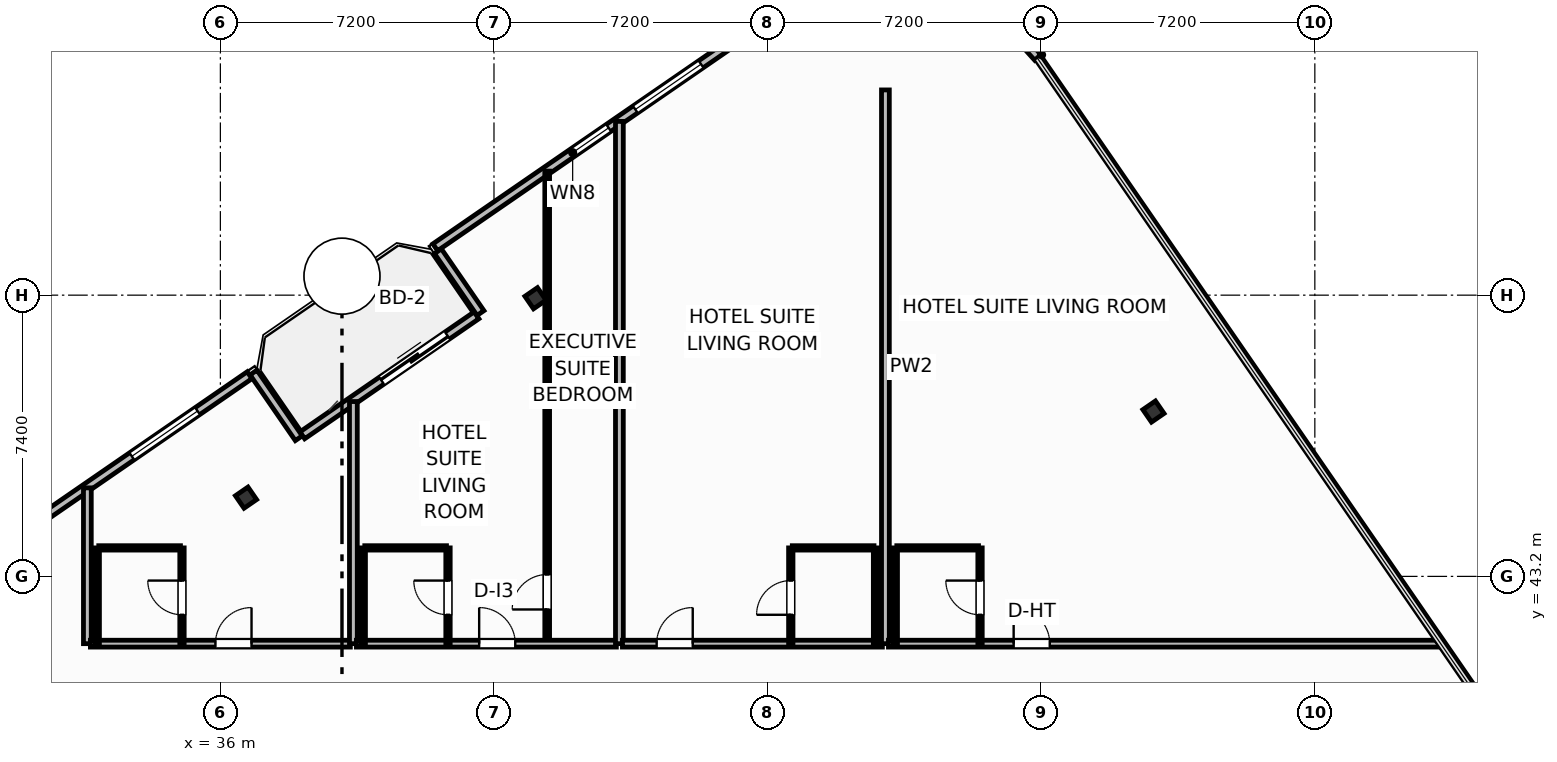
"""IFC4 building model, lengths in metres.
Left out: names, types, materials, properties, quantities, classifications, styles, units other than length and angle.
Written with IfcOpenShell. Run it as: python <this file> out.ifc"""

import sys

from ifc_helpers import new_model, si_unit, direction, frame, frame_2d, origin, origin_2d, place, context, subcontext, project, spatial, rectangle, i_section, extrude, element, fill, save


model = new_model("IFC4")
c1 = context("Model", 3, precision=1e-05, world=origin(), true_north=direction((0.0, 1.0)))
c2 = subcontext(c1, "Body", "Model", "MODEL_VIEW")
j1 = project(units=[si_unit("LENGTHUNIT", "METRE"), si_unit("PLANEANGLEUNIT", "RADIAN")], contexts=[c1])
p1 = place(None, origin())
s1 = spatial("IfcSite", under=j1, at=p1, CompositionType="ELEMENT")
p2 = place(p1, origin())
s2 = spatial("IfcBuilding", under=s1, at=p2, CompositionType="ELEMENT")
p3 = place(p2, frame((0.0, 0.0, 280.4)))
s3 = spatial("IfcBuildingStorey", under=s2, at=p3, CompositionType="ELEMENT", Elevation=280.4)
for number, where, z_axis, x_axis in (
    (1, (60.554, 47.537, 0.0), (0.0, 0.0, 1.0), (0.824, 0.567, 0.0)),
    (2, (44.292, 50.519, 0.0), (0.0, 0.0, 1.0), (0.824, 0.567, 0.0)),
    (3, (36.675, 45.272, 0.0), (0.0, 0.0, 1.0), (0.824, 0.567, 0.0)),
):
    element("IfcColumn", number, at=place(p3, frame(where, z_axis=z_axis, x_axis=x_axis)), inside=s3, PredefinedType="COLUMN", context=c2, shape_type="SweptSolid", body=[
        extrude(i_section(OverallWidth=0.401, OverallDepth=0.399, WebThickness=0.025, FlangeThickness=0.04, FilletRadius=0.022, at=origin_2d()), origin(), (0.0, 0.0, 1.0), 3.7),
    ])
p4 = place(p3, frame((38.156, 46.912, 0.0), z_axis=(0.0, 0.0, 1.0), x_axis=(0.823527178548, 0.567276816195, 0.0)))
e4 = element("IfcWall", 4, at=p4, inside=s3, PredefinedType="SOLIDWALL", context=c2, shape_type="SweptSolid", body=[
    extrude(rectangle(XDim=5.567, YDim=0.22, at=frame_2d((2.783, 0.0))), origin(), (0.0, 0.0, 1.0), 2.73),
])
p5 = place(p4, frame((2.534, 0.0, 0.0)))
e5 = element("IfcOpeningElement", 5, at=p5, cuts=e4, PredefinedType="OPENING", context=c2, shape_type="SweptSolid", body=[
    extrude(rectangle(XDim=2.1, YDim=2.3, at=frame_2d((1.05, 1.15))), frame((0.0, 0.12, 0.0), z_axis=(0.0, -1.0, 0.0), x_axis=(1.0, 0.0, 0.0)), (0.0, 0.0, 1.0), 0.24),
])
p6 = place(p3, frame((57.51, 56.855, 0.0), z_axis=(0.0, 0.0, 1.0), x_axis=(-0.669853727156, 0.742493086982, 0.0)))
e6 = element("IfcWall", 6, at=p6, inside=s3, PredefinedType="SOLIDWALL", context=c2, shape_type="SweptSolid", body=[
    extrude(rectangle(XDim=1.274, YDim=0.22, at=frame_2d((0.637, 0.0))), origin(), (0.0, 0.0, 1.0), 2.73),
])
p7 = place(p3, frame((50.697, 58.087, 0.0), z_axis=(0.0, 0.0, 1.0), x_axis=(-0.823539455464, -0.567258993137, 0.0)))
e7 = element("IfcWall", 7, at=p7, inside=s3, PredefinedType="SOLIDWALL", context=c2, shape_type="SweptSolid", body=[
    extrude(rectangle(XDim=10.98, YDim=0.22, at=frame_2d((5.49, 0.0))), origin(), (0.0, 0.0, 1.0), 2.73),
])
p8 = place(p7, frame((2.486, 0.0, 0.8)))
e8 = element("IfcOpeningElement", 8, at=p8, cuts=e7, PredefinedType="OPENING", context=c2, shape_type="SweptSolid", body=[
    extrude(rectangle(XDim=2.1, YDim=1.75, at=frame_2d((1.05, 0.875))), frame((0.0, 0.12, 0.0), z_axis=(0.0, -1.0, 0.0), x_axis=(1.0, 0.0, 0.0)), (0.0, 0.0, 1.0), 0.24),
])
p9 = place(p7, frame((5.439, 0.0, 0.8)))
e9 = element("IfcOpeningElement", 9, at=p9, cuts=e7, PredefinedType="OPENING", context=c2, shape_type="SweptSolid", body=[
    extrude(rectangle(XDim=1.15, YDim=1.4, at=frame_2d((0.575, 0.7))), frame((0.0, 0.12, 0.0), z_axis=(0.0, -1.0, 0.0), x_axis=(1.0, 0.0, 0.0)), (0.0, 0.0, 1.0), 0.24),
])
p10 = place(p3, frame((41.725, 51.756, 0.0), z_axis=(0.0, 0.0, 1.0), x_axis=(0.567273565974, -0.823529417415, 0.0)))
e10 = element("IfcWall", 10, at=p10, inside=s3, PredefinedType="SOLIDWALL", context=c2, shape_type="SweptSolid", body=[
    extrude(rectangle(XDim=1.975, YDim=0.22, at=frame_2d((0.988, 0.0))), origin(), (0.0, 0.0, 1.0), 2.73),
])
p11 = place(p3, frame((38.063, 46.835, 0.0), z_axis=(0.0, 0.0, 1.0), x_axis=(-0.567219383419, 0.823566737474, 0.0)))
e11 = element("IfcWall", 11, at=p11, inside=s3, PredefinedType="SOLIDWALL", context=c2, shape_type="SweptSolid", body=[
    extrude(rectangle(XDim=2.1, YDim=0.22, at=frame_2d((1.05, 0.0))), origin(), (0.0, 0.0, 1.0), 2.73),
])
p12 = place(p3, frame((36.769, 48.494, 0.0), z_axis=(0.0, 0.0, 1.0), x_axis=(-0.823521165086, -0.56728554596, 0.0)))
e12 = element("IfcWall", 12, at=p12, inside=s3, PredefinedType="SOLIDWALL", context=c2, shape_type="SweptSolid", body=[
    extrude(rectangle(XDim=8.035, YDim=0.22, at=frame_2d((4.018, 0.0))), origin(), (0.0, 0.0, 1.0), 2.73),
])
p13 = place(p12, frame((1.662, 0.0, 0.8)))
e13 = element("IfcOpeningElement", 13, at=p13, cuts=e12, PredefinedType="OPENING", context=c2, shape_type="SweptSolid", body=[
    extrude(rectangle(XDim=2.1, YDim=1.75, at=frame_2d((1.05, 0.875))), frame((0.0, 0.12, 0.0), z_axis=(0.0, -1.0, 0.0), x_axis=(1.0, 0.0, 0.0)), (0.0, 0.0, 1.0), 0.24),
])
p14 = place(p3, frame((32.5, 41.43, 0.0), z_axis=(0.0, 0.0, 1.0), x_axis=(0.0, 1.0, 0.0)))
e14 = element("IfcWall", 14, at=p14, inside=s3, PredefinedType="PARTITIONING", context=c2, shape_type="SweptSolid", body=[
    extrude(rectangle(XDim=4.099, YDim=0.205, at=frame_2d((2.05, 0.0))), origin(), (0.0, 0.0, 1.0), 3.45),
])
p15 = place(p3, frame((32.58, 41.43, 0.0), z_axis=(0.0, 0.0, 1.0), x_axis=(1.0, 0.0, 0.0)))
e15 = element("IfcWall", 15, at=p15, inside=s3, PredefinedType="PARTITIONING", context=c2, shape_type="SweptSolid", body=[
    extrude(rectangle(XDim=6.84, YDim=0.18, at=frame_2d((3.42, 0.0))), origin(), (0.0, 0.0, 1.0), 3.45),
])
p16 = place(p15, frame((3.29, 0.0, 0.0)))
e16 = element("IfcOpeningElement", 16, at=p16, cuts=e15, PredefinedType="OPENING", context=c2, shape_type="SweptSolid", body=[
    extrude(rectangle(XDim=0.95, YDim=2.15, at=frame_2d((0.475, 1.075))), frame((0.0, 0.1, 0.0), z_axis=(0.0, -1.0, 0.0), x_axis=(1.0, 0.0, 0.0)), (0.0, 0.0, 1.0), 0.2),
])
p17 = place(p3, frame((32.8, 43.95, 0.0), z_axis=(0.0, 0.0, 1.0), x_axis=(1.0, 0.0, 0.0)))
e17 = element("IfcWall", 17, at=p17, inside=s3, PredefinedType="PARTITIONING", context=c2, shape_type="SweptSolid", body=[
    extrude(rectangle(XDim=2.15, YDim=0.115, at=frame_2d((1.075, 0.0))), origin(), (0.0, 0.0, 1.0), 3.45),
])
p18 = place(p3, frame((34.99, 41.43, 0.0), z_axis=(0.0, 0.0, 1.0), x_axis=(0.0, 1.0, 0.0)))
e18 = element("IfcWall", 18, at=p18, inside=s3, PredefinedType="PARTITIONING", context=c2, shape_type="SweptSolid", body=[
    extrude(rectangle(XDim=2.52, YDim=0.115, at=frame_2d((1.26, 0.0))), origin(), (0.0, 0.0, 1.0), 3.45),
])
p19 = place(p18, frame((0.76, 0.0, 0.0)))
e19 = element("IfcOpeningElement", 19, at=p19, cuts=e18, PredefinedType="OPENING", context=c2, shape_type="SweptSolid", body=[
    extrude(rectangle(XDim=0.9, YDim=2.05, at=frame_2d((0.45, 1.025))), frame((0.0, 0.067, 0.0), z_axis=(0.0, -1.0, 0.0), x_axis=(1.0, 0.0, 0.0)), (0.0, 0.0, 1.0), 0.135),
])
p20 = place(p3, frame((32.76, 41.43, 0.0), z_axis=(0.0, 0.0, 1.0), x_axis=(0.0, 1.0, 0.0)))
e20 = element("IfcWall", 20, at=p20, inside=s3, PredefinedType="PARTITIONING", context=c2, shape_type="SweptSolid", body=[
    extrude(rectangle(XDim=2.52, YDim=0.115, at=frame_2d((1.26, 0.0))), origin(), (0.0, 0.0, 1.0), 3.45),
])
p21 = place(p3, frame((39.5, 41.43, 0.0), z_axis=(0.0, 0.0, 1.0), x_axis=(0.0, 1.0, 0.0)))
e21 = element("IfcWall", 21, at=p21, inside=s3, PredefinedType="PARTITIONING", context=c2, shape_type="SweptSolid", body=[
    extrude(rectangle(XDim=6.371, YDim=0.205, at=frame_2d((3.186, 0.0))), origin(), (0.0, 0.0, 1.0), 3.45),
])
p22 = place(p3, frame((44.6, 41.43, 0.0), z_axis=(0.0, 0.0, 1.0), x_axis=(0.0, 1.0, 0.0)))
e22 = element("IfcWall", 22, at=p22, inside=s3, PredefinedType="PARTITIONING", context=c2, shape_type="SweptSolid", body=[
    extrude(rectangle(XDim=12.434, YDim=0.125, at=frame_2d((6.217, 0.0))), origin(), (0.0, 0.0, 1.0), 3.45),
])
p23 = place(p22, frame((0.9, 0.0, 0.0)))
e23 = element("IfcOpeningElement", 23, at=p23, cuts=e22, PredefinedType="OPENING", context=c2, shape_type="SweptSolid", body=[
    extrude(rectangle(XDim=0.92, YDim=2.05, at=frame_2d((0.46, 1.025))), frame((0.0, 0.073, 0.0), z_axis=(0.0, -1.0, 0.0), x_axis=(1.0, 0.0, 0.0)), (0.0, 0.0, 1.0), 0.145),
])
p24 = place(p3, frame((39.58, 41.43, 0.0), z_axis=(0.0, 0.0, 1.0), x_axis=(1.0, 0.0, 0.0)))
e24 = element("IfcWall", 24, at=p24, inside=s3, PredefinedType="PARTITIONING", context=c2, shape_type="SweptSolid", body=[
    extrude(rectangle(XDim=6.84, YDim=0.18, at=frame_2d((3.42, 0.0))), origin(), (0.0, 0.0, 1.0), 3.45),
])
p25 = place(p24, frame((3.23, 0.0, 0.0)))
e25 = element("IfcOpeningElement", 25, at=p25, cuts=e24, PredefinedType="OPENING", context=c2, shape_type="SweptSolid", body=[
    extrude(rectangle(XDim=0.95, YDim=2.15, at=frame_2d((0.475, 1.075))), frame((0.0, 0.1, 0.0), z_axis=(0.0, -1.0, 0.0), x_axis=(1.0, 0.0, 0.0)), (0.0, 0.0, 1.0), 0.2),
])
p26 = place(p3, frame((39.8, 43.95, 0.0), z_axis=(0.0, 0.0, 1.0), x_axis=(1.0, 0.0, 0.0)))
e26 = element("IfcWall", 26, at=p26, inside=s3, PredefinedType="PARTITIONING", context=c2, shape_type="SweptSolid", body=[
    extrude(rectangle(XDim=2.15, YDim=0.115, at=frame_2d((1.075, 0.0))), origin(), (0.0, 0.0, 1.0), 3.45),
])
p27 = place(p3, frame((41.99, 41.43, 0.0), z_axis=(0.0, 0.0, 1.0), x_axis=(0.0, 1.0, 0.0)))
e27 = element("IfcWall", 27, at=p27, inside=s3, PredefinedType="PARTITIONING", context=c2, shape_type="SweptSolid", body=[
    extrude(rectangle(XDim=2.52, YDim=0.115, at=frame_2d((1.26, 0.0))), origin(), (0.0, 0.0, 1.0), 3.45),
])
p28 = place(p27, frame((0.76, 0.0, 0.0)))
e28 = element("IfcOpeningElement", 28, at=p28, cuts=e27, PredefinedType="OPENING", context=c2, shape_type="SweptSolid", body=[
    extrude(rectangle(XDim=0.9, YDim=2.05, at=frame_2d((0.45, 1.025))), frame((0.0, 0.067, 0.0), z_axis=(0.0, -1.0, 0.0), x_axis=(1.0, 0.0, 0.0)), (0.0, 0.0, 1.0), 0.135),
])
p29 = place(p3, frame((39.76, 41.43, 0.0), z_axis=(0.0, 0.0, 1.0), x_axis=(0.0, 1.0, 0.0)))
e29 = element("IfcWall", 29, at=p29, inside=s3, PredefinedType="PARTITIONING", context=c2, shape_type="SweptSolid", body=[
    extrude(rectangle(XDim=2.52, YDim=0.115, at=frame_2d((1.26, 0.0))), origin(), (0.0, 0.0, 1.0), 3.45),
])
p30 = place(p3, frame((46.5, 41.43, 0.0), z_axis=(0.0, 0.0, 1.0), x_axis=(0.0, 1.0, 0.0)))
e30 = element("IfcWall", 30, at=p30, inside=s3, PredefinedType="PARTITIONING", context=c2, shape_type="SweptSolid", body=[
    extrude(rectangle(XDim=13.743, YDim=0.205, at=frame_2d((6.871, 0.0))), origin(), (0.0, 0.0, 1.0), 3.45),
])
p31 = place(p3, frame((46.58, 41.43, 0.0), z_axis=(0.0, 0.0, 1.0), x_axis=(1.0, 0.0, 0.0)))
e31 = element("IfcWall", 31, at=p31, inside=s3, PredefinedType="PARTITIONING", context=c2, shape_type="SweptSolid", body=[
    extrude(rectangle(XDim=6.84, YDim=0.18, at=frame_2d((3.42, 0.0))), origin(), (0.0, 0.0, 1.0), 3.45),
])
p32 = place(p31, frame((0.9, 0.0, 0.0)))
e32 = element("IfcOpeningElement", 32, at=p32, cuts=e31, PredefinedType="OPENING", context=c2, shape_type="SweptSolid", body=[
    extrude(rectangle(XDim=0.95, YDim=2.15, at=frame_2d((0.475, 1.075))), frame((0.0, 0.1, 0.0), z_axis=(0.0, -1.0, 0.0), x_axis=(1.0, 0.0, 0.0)), (0.0, 0.0, 1.0), 0.2),
])
p33 = place(p3, frame((51.05, 43.95, 0.0), z_axis=(0.0, 0.0, 1.0), x_axis=(1.0, 0.0, 0.0)))
e33 = element("IfcWall", 33, at=p33, inside=s3, PredefinedType="PARTITIONING", context=c2, shape_type="SweptSolid", body=[
    extrude(rectangle(XDim=2.15, YDim=0.115, at=frame_2d((1.075, 0.0))), origin(), (0.0, 0.0, 1.0), 3.45),
])
p34 = place(p3, frame((51.01, 41.43, 0.0), z_axis=(0.0, 0.0, 1.0), x_axis=(0.0, 1.0, 0.0)))
e34 = element("IfcWall", 34, at=p34, inside=s3, PredefinedType="PARTITIONING", context=c2, shape_type="SweptSolid", body=[
    extrude(rectangle(XDim=2.52, YDim=0.115, at=frame_2d((1.26, 0.0))), origin(), (0.0, 0.0, 1.0), 3.45),
])
p35 = place(p34, frame((0.76, 0.0, 0.0)))
e35 = element("IfcOpeningElement", 35, at=p35, cuts=e34, PredefinedType="OPENING", context=c2, shape_type="SweptSolid", body=[
    extrude(rectangle(XDim=0.9, YDim=2.05, at=frame_2d((0.45, 1.025))), frame((0.0, 0.067, 0.0), z_axis=(0.0, -1.0, 0.0), x_axis=(1.0, 0.0, 0.0)), (0.0, 0.0, 1.0), 0.135),
])
p36 = place(p3, frame((53.24, 41.43, 0.0), z_axis=(0.0, 0.0, 1.0), x_axis=(0.0, 1.0, 0.0)))
e36 = element("IfcWall", 36, at=p36, inside=s3, PredefinedType="PARTITIONING", context=c2, shape_type="SweptSolid", body=[
    extrude(rectangle(XDim=2.52, YDim=0.115, at=frame_2d((1.26, 0.0))), origin(), (0.0, 0.0, 1.0), 3.45),
])
p37 = place(p3, frame((53.5, 41.43, 0.0), z_axis=(0.0, 0.0, 1.0), x_axis=(0.0, 1.0, 0.0)))
e37 = element("IfcWall", 37, at=p37, inside=s3, PredefinedType="PARTITIONING", context=c2, shape_type="SweptSolid", body=[
    extrude(rectangle(XDim=14.57, YDim=0.205, at=frame_2d((7.285, 0.0))), origin(), (0.0, 0.0, 1.0), 3.45),
])
p38 = place(p3, frame((53.58, 41.43, 0.0), z_axis=(0.0, 0.0, 1.0), x_axis=(1.0, 0.0, 0.0)))
e38 = element("IfcWall", 38, at=p38, inside=s3, PredefinedType="PARTITIONING", context=c2, shape_type="SweptSolid", body=[
    extrude(rectangle(XDim=14.492, YDim=0.18, at=frame_2d((7.246, 0.0))), origin(), (0.0, 0.0, 1.0), 3.45),
])
p39 = place(p38, frame((3.294, 0.0, 0.0)))
e39 = element("IfcOpeningElement", 39, at=p39, cuts=e38, PredefinedType="OPENING", context=c2, shape_type="SweptSolid", body=[
    extrude(rectangle(XDim=0.95, YDim=2.15, at=frame_2d((0.475, 1.075))), frame((0.0, 0.1, 0.0), z_axis=(0.0, -1.0, 0.0), x_axis=(1.0, 0.0, 0.0)), (0.0, 0.0, 1.0), 0.2),
])
p40 = place(p3, frame((53.8, 43.95, 0.0), z_axis=(0.0, 0.0, 1.0), x_axis=(1.0, 0.0, 0.0)))
e40 = element("IfcWall", 40, at=p40, inside=s3, PredefinedType="PARTITIONING", context=c2, shape_type="SweptSolid", body=[
    extrude(rectangle(XDim=2.15, YDim=0.115, at=frame_2d((1.075, 0.0))), origin(), (0.0, 0.0, 1.0), 3.45),
])
p41 = place(p3, frame((55.99, 41.43, 0.0), z_axis=(0.0, 0.0, 1.0), x_axis=(0.0, 1.0, 0.0)))
e41 = element("IfcWall", 41, at=p41, inside=s3, PredefinedType="PARTITIONING", context=c2, shape_type="SweptSolid", body=[
    extrude(rectangle(XDim=2.52, YDim=0.115, at=frame_2d((1.26, 0.0))), origin(), (0.0, 0.0, 1.0), 3.45),
])
p42 = place(p41, frame((0.76, 0.0, 0.0)))
e42 = element("IfcOpeningElement", 42, at=p42, cuts=e41, PredefinedType="OPENING", context=c2, shape_type="SweptSolid", body=[
    extrude(rectangle(XDim=0.9, YDim=2.05, at=frame_2d((0.45, 1.025))), frame((0.0, 0.067, 0.0), z_axis=(0.0, -1.0, 0.0), x_axis=(1.0, 0.0, 0.0)), (0.0, 0.0, 1.0), 0.135),
])
p43 = place(p3, frame((53.76, 41.43, 0.0), z_axis=(0.0, 0.0, 1.0), x_axis=(0.0, 1.0, 0.0)))
e43 = element("IfcWall", 43, at=p43, inside=s3, PredefinedType="PARTITIONING", context=c2, shape_type="SweptSolid", body=[
    extrude(rectangle(XDim=2.52, YDim=0.115, at=frame_2d((1.26, 0.0))), origin(), (0.0, 0.0, 1.0), 3.45),
])
p44 = place(p5, origin())
e44 = element("IfcDoor", 44, at=p44, inside=s3, OperationType="SLIDING_TO_LEFT", PredefinedType="DOOR", context=c2, shape_type="SweptSolid", body=[
    extrude(rectangle(XDim=2.1, YDim=2.3, at=frame_2d((1.05, 1.15))), frame((0.0, 0.025, 0.0), z_axis=(0.0, -1.0, 0.0), x_axis=(1.0, 0.0, 0.0)), (0.0, 0.0, 1.0), 0.05),
])
fill(e5, e44)
p45 = place(p8, origin())
e45 = element("IfcWindow", 45, at=p45, inside=s3, PartitioningType="SINGLE_PANEL", PredefinedType="WINDOW", context=c2, shape_type="SweptSolid", body=[
    extrude(rectangle(XDim=2.1, YDim=1.75, at=frame_2d((1.05, 0.875))), frame((0.0, 0.03, 0.0), z_axis=(0.0, -1.0, 0.0), x_axis=(1.0, 0.0, 0.0)), (0.0, 0.0, 1.0), 0.06),
])
fill(e8, e45)
p46 = place(p13, origin())
e46 = element("IfcWindow", 46, at=p46, inside=s3, PartitioningType="SINGLE_PANEL", PredefinedType="WINDOW", context=c2, shape_type="SweptSolid", body=[
    extrude(rectangle(XDim=2.1, YDim=1.75, at=frame_2d((1.05, 0.875))), frame((0.0, 0.03, 0.0), z_axis=(0.0, -1.0, 0.0), x_axis=(1.0, 0.0, 0.0)), (0.0, 0.0, 1.0), 0.06),
])
fill(e13, e46)
p47 = place(p16, origin())
e47 = element("IfcDoor", 47, at=p47, inside=s3, OperationType="SINGLE_SWING_RIGHT", PredefinedType="DOOR", context=c2, shape_type="SweptSolid", body=[
    extrude(rectangle(XDim=0.95, YDim=2.15, at=frame_2d((0.475, 1.075))), frame((0.0, 0.025, 0.0), z_axis=(0.0, -1.0, 0.0), x_axis=(1.0, 0.0, 0.0)), (0.0, 0.0, 1.0), 0.05),
])
fill(e16, e47)
p48 = place(p19, origin())
e48 = element("IfcDoor", 48, at=p48, inside=s3, OperationType="SINGLE_SWING_RIGHT", PredefinedType="DOOR", context=c2, shape_type="SweptSolid", body=[
    extrude(rectangle(XDim=0.9, YDim=2.05, at=frame_2d((0.45, 1.025))), frame((0.0, 0.025, 0.0), z_axis=(0.0, -1.0, 0.0), x_axis=(1.0, 0.0, 0.0)), (0.0, 0.0, 1.0), 0.05),
])
fill(e19, e48)
p49 = place(p23, origin())
e49 = element("IfcDoor", 49, at=p49, inside=s3, OperationType="SINGLE_SWING_LEFT", PredefinedType="DOOR", context=c2, shape_type="SweptSolid", body=[
    extrude(rectangle(XDim=0.92, YDim=2.05, at=frame_2d((0.46, 1.025))), frame((0.0, 0.025, 0.0), z_axis=(0.0, -1.0, 0.0), x_axis=(1.0, 0.0, 0.0)), (0.0, 0.0, 1.0), 0.05),
])
fill(e23, e49)
p50 = place(p25, origin())
e50 = element("IfcDoor", 50, at=p50, inside=s3, OperationType="SINGLE_SWING_LEFT", PredefinedType="DOOR", context=c2, shape_type="SweptSolid", body=[
    extrude(rectangle(XDim=0.95, YDim=2.15, at=frame_2d((0.475, 1.075))), frame((0.0, 0.025, 0.0), z_axis=(0.0, -1.0, 0.0), x_axis=(1.0, 0.0, 0.0)), (0.0, 0.0, 1.0), 0.05),
])
fill(e25, e50)
p51 = place(p28, origin())
e51 = element("IfcDoor", 51, at=p51, inside=s3, OperationType="SINGLE_SWING_RIGHT", PredefinedType="DOOR", context=c2, shape_type="SweptSolid", body=[
    extrude(rectangle(XDim=0.9, YDim=2.05, at=frame_2d((0.45, 1.025))), frame((0.0, 0.025, 0.0), z_axis=(0.0, -1.0, 0.0), x_axis=(1.0, 0.0, 0.0)), (0.0, 0.0, 1.0), 0.05),
])
fill(e28, e51)
p52 = place(p32, origin())
e52 = element("IfcDoor", 52, at=p52, inside=s3, OperationType="SINGLE_SWING_RIGHT", PredefinedType="DOOR", context=c2, shape_type="SweptSolid", body=[
    extrude(rectangle(XDim=0.95, YDim=2.15, at=frame_2d((0.475, 1.075))), frame((0.0, 0.025, 0.0), z_axis=(0.0, -1.0, 0.0), x_axis=(1.0, 0.0, 0.0)), (0.0, 0.0, 1.0), 0.05),
])
fill(e32, e52)
p53 = place(p35, origin())
e53 = element("IfcDoor", 53, at=p53, inside=s3, OperationType="SINGLE_SWING_LEFT", PredefinedType="DOOR", context=c2, shape_type="SweptSolid", body=[
    extrude(rectangle(XDim=0.9, YDim=2.05, at=frame_2d((0.45, 1.025))), frame((0.0, 0.025, 0.0), z_axis=(0.0, -1.0, 0.0), x_axis=(1.0, 0.0, 0.0)), (0.0, 0.0, 1.0), 0.05),
])
fill(e35, e53)
p54 = place(p39, origin())
e54 = element("IfcDoor", 54, at=p54, inside=s3, OperationType="SINGLE_SWING_LEFT", PredefinedType="DOOR", context=c2, shape_type="SweptSolid", body=[
    extrude(rectangle(XDim=0.95, YDim=2.15, at=frame_2d((0.475, 1.075))), frame((0.0, 0.025, 0.0), z_axis=(0.0, -1.0, 0.0), x_axis=(1.0, 0.0, 0.0)), (0.0, 0.0, 1.0), 0.05),
])
fill(e39, e54)
p55 = place(p42, origin())
e55 = element("IfcDoor", 55, at=p55, inside=s3, OperationType="SINGLE_SWING_RIGHT", PredefinedType="DOOR", context=c2, shape_type="SweptSolid", body=[
    extrude(rectangle(XDim=0.9, YDim=2.05, at=frame_2d((0.45, 1.025))), frame((0.0, 0.025, 0.0), z_axis=(0.0, -1.0, 0.0), x_axis=(1.0, 0.0, 0.0)), (0.0, 0.0, 1.0), 0.05),
])
fill(e42, e55)
p56 = place(p9, origin())
e56 = element("IfcWindow", 56, at=p56, inside=s3, PartitioningType="SINGLE_PANEL", PredefinedType="WINDOW", context=c2, shape_type="SweptSolid", body=[
    extrude(rectangle(XDim=1.15, YDim=1.4, at=frame_2d((0.575, 0.7))), frame((0.0, 0.03, 0.0), z_axis=(0.0, -1.0, 0.0), x_axis=(1.0, 0.0, 0.0)), (0.0, 0.0, 1.0), 0.06),
])
fill(e9, e56)
save(model, sys.argv[1])
